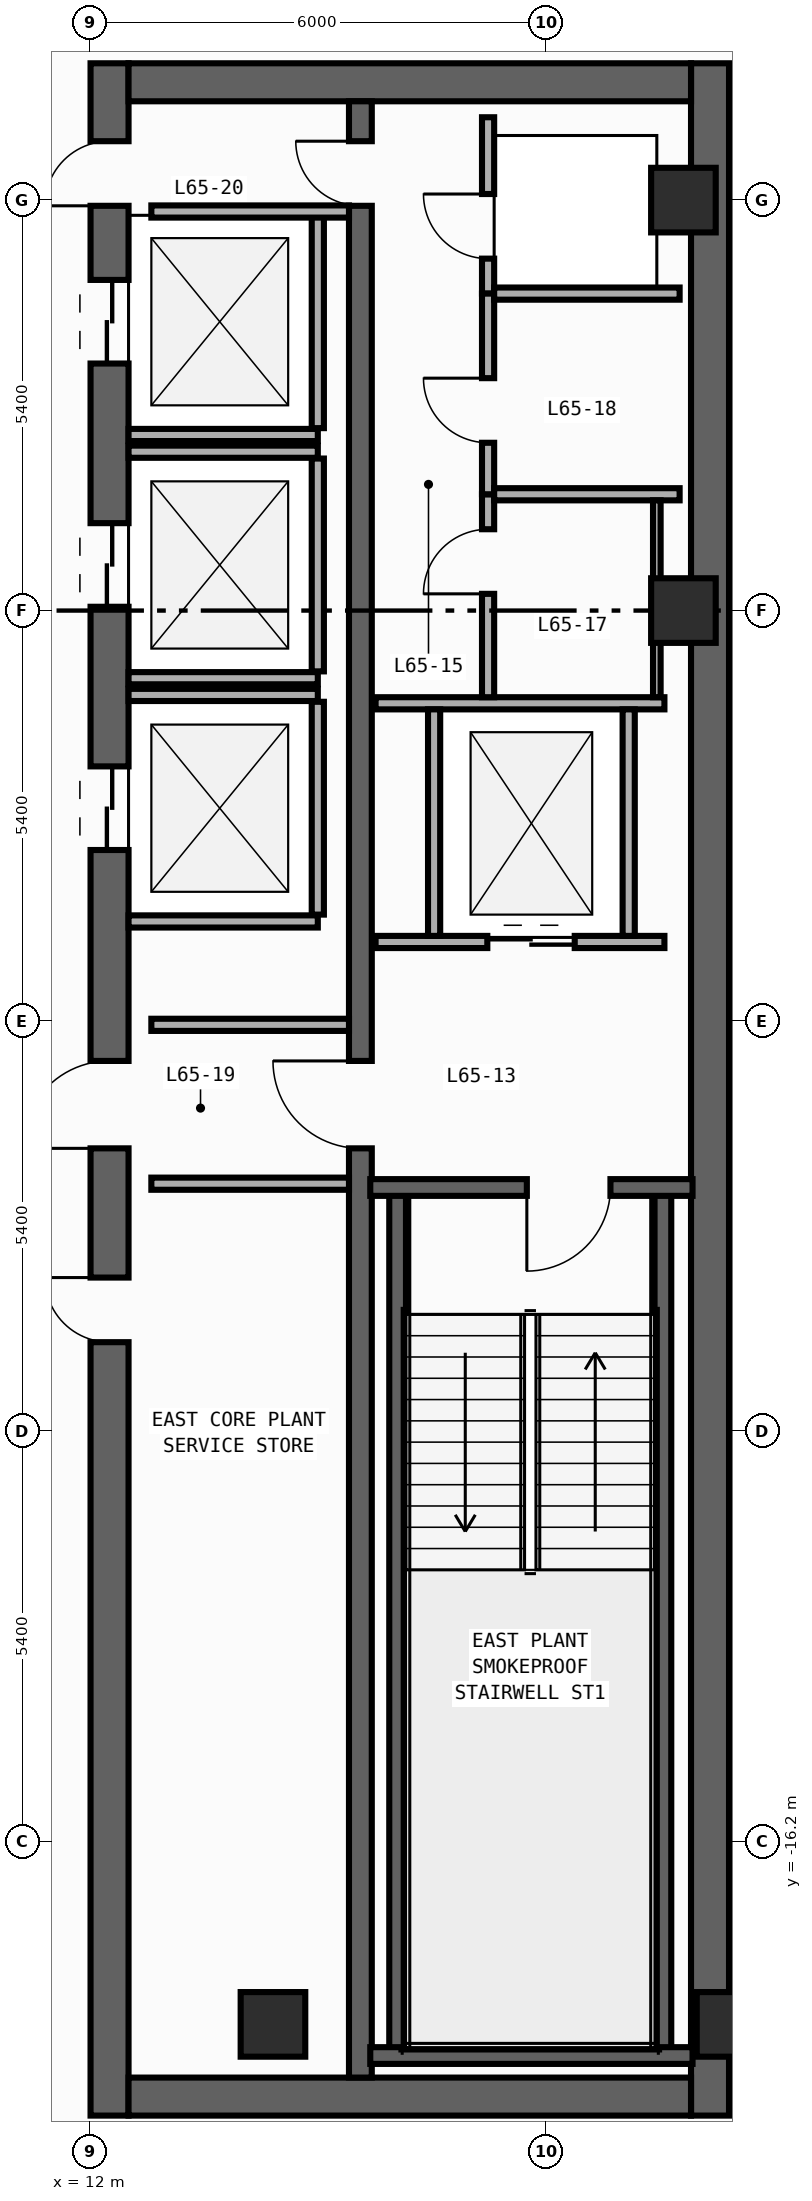
"""IFC4 building model, lengths in metres.
Left out: names, types, materials, properties, quantities, classifications, styles, units other than length and angle.
Written with IfcOpenShell. Run it as: python <this file> out.ifc"""

import sys

from ifc_helpers import new_model, si_unit, direction, frame, frame_2d, origin, origin_2d, place, context, subcontext, project, spatial, rectangle, extrude, element, fill, save


model = new_model("IFC4")
c1 = context("Model", 3, precision=1e-05, world=origin(), true_north=direction((0.0, 1.0)))
c2 = subcontext(c1, "Body", "Model", "MODEL_VIEW")
j1 = project(units=[si_unit("LENGTHUNIT", "METRE"), si_unit("PLANEANGLEUNIT", "RADIAN")], contexts=[c1])
p1 = place(None, origin())
s1 = spatial("IfcSite", under=j1, at=p1, CompositionType="ELEMENT")
p2 = place(p1, origin())
s2 = spatial("IfcBuilding", under=s1, at=p2, CompositionType="ELEMENT")
p3 = place(p2, frame((0.0, 0.0, 272.8)))
s3 = spatial("IfcBuildingStorey", under=s2, at=p3, CompositionType="ELEMENT", Elevation=272.8)
p4 = place(p3, frame((12.25, -19.8, 0.0), z_axis=(0.0, 0.0, 1.0), x_axis=(0.0, 1.0, 0.0)))
e1 = element("IfcWall", 1, at=p4, inside=s3, PredefinedType="SHEAR", context=c2, shape_type="SweptSolid", body=[
    extrude(rectangle(XDim=27.0, YDim=0.5, at=frame_2d((13.5, 0.0))), origin(), (0.0, 0.0, 1.0), 4.54),
])
p5 = place(p4, frame((23.05, 0.0, 0.0)))
e2 = element("IfcOpeningElement", 2, at=p5, cuts=e1, PredefinedType="OPENING", context=c2, shape_type="SweptSolid", body=[
    extrude(rectangle(XDim=1.1, YDim=2.2, at=frame_2d((0.55, 1.1))), frame((0.0, 0.26, 0.0), z_axis=(0.0, -1.0, 0.0), x_axis=(1.0, 0.0, 0.0)), (0.0, 0.0, 1.0), 0.52),
])
p6 = place(p4, frame((19.85, 0.0, 0.0)))
e3 = element("IfcOpeningElement", 3, at=p6, cuts=e1, PredefinedType="OPENING", context=c2, shape_type="SweptSolid", body=[
    extrude(rectangle(XDim=1.1, YDim=2.2, at=frame_2d((0.55, 1.1))), frame((0.0, 0.26, 0.0), z_axis=(0.0, -1.0, 0.0), x_axis=(1.0, 0.0, 0.0)), (0.0, 0.0, 1.0), 0.52),
])
p7 = place(p4, frame((16.65, 0.0, 0.0)))
e4 = element("IfcOpeningElement", 4, at=p7, cuts=e1, PredefinedType="OPENING", context=c2, shape_type="SweptSolid", body=[
    extrude(rectangle(XDim=1.1, YDim=2.2, at=frame_2d((0.55, 1.1))), frame((0.0, 0.26, 0.0), z_axis=(0.0, -1.0, 0.0), x_axis=(1.0, 0.0, 0.0)), (0.0, 0.0, 1.0), 0.52),
])
p8 = place(p4, frame((10.175, 0.0, 0.0)))
e5 = element("IfcOpeningElement", 5, at=p8, cuts=e1, PredefinedType="OPENING", context=c2, shape_type="SweptSolid", body=[
    extrude(rectangle(XDim=0.85, YDim=2.1, at=frame_2d((0.425, 1.05))), frame((0.0, 0.26, 0.0), z_axis=(0.0, -1.0, 0.0), x_axis=(1.0, 0.0, 0.0)), (0.0, 0.0, 1.0), 0.52),
])
p9 = place(p4, frame((12.725, 0.0, 0.0)))
e6 = element("IfcOpeningElement", 6, at=p9, cuts=e1, PredefinedType="OPENING", context=c2, shape_type="SweptSolid", body=[
    extrude(rectangle(XDim=1.15, YDim=2.2, at=frame_2d((0.575, 1.1))), frame((0.0, 0.26, 0.0), z_axis=(0.0, -1.0, 0.0), x_axis=(1.0, 0.0, 0.0)), (0.0, 0.0, 1.0), 0.52),
])
p10 = place(p4, frame((25.125, 0.0, 0.0)))
e7 = element("IfcOpeningElement", 7, at=p10, cuts=e1, PredefinedType="OPENING", context=c2, shape_type="SweptSolid", body=[
    extrude(rectangle(XDim=0.85, YDim=2.1, at=frame_2d((0.425, 1.05))), frame((0.0, 0.26, 0.0), z_axis=(0.0, -1.0, 0.0), x_axis=(1.0, 0.0, 0.0)), (0.0, 0.0, 1.0), 0.52),
])
p11 = place(p3, frame((20.15, -19.8, 0.0), z_axis=(0.0, 0.0, 1.0), x_axis=(0.0, 1.0, 0.0)))
e8 = element("IfcWall", 8, at=p11, inside=s3, PredefinedType="SHEAR", context=c2, shape_type="SweptSolid", body=[
    extrude(rectangle(XDim=27.0, YDim=0.5, at=frame_2d((13.5, 0.0))), origin(), (0.0, 0.0, 1.0), 4.54),
])
for number, where, z_axis, x_axis in (
    (9, (12.5, -19.55, 0.0), (0.0, 0.0, 1.0), (1.0, 0.0, 0.0)),
    (10, (12.5, 6.95, 0.0), (0.0, 0.0, 1.0), (1.0, 0.0, 0.0)),
):
    element("IfcWall", number, at=place(p3, frame(where, z_axis=z_axis, x_axis=x_axis)), inside=s3, PredefinedType="SHEAR", context=c2, shape_type="SweptSolid", body=[
        extrude(rectangle(XDim=7.4, YDim=0.5, at=frame_2d((3.7, 0.0))), origin(), (0.0, 0.0, 1.0), 4.54),
    ])
p12 = place(p3, frame((15.55, -19.3, 0.0), z_axis=(0.0, 0.0, 1.0), x_axis=(0.0, 1.0, 0.0)))
e11 = element("IfcWall", 11, at=p12, inside=s3, PredefinedType="SHEAR", context=c2, shape_type="SweptSolid", body=[
    extrude(rectangle(XDim=26.0, YDim=0.3, at=frame_2d((13.0, 0.0))), origin(), (0.0, 0.0, 1.0), 4.54),
])
p13 = place(p12, frame((12.225, 0.0, 0.0)))
e12 = element("IfcOpeningElement", 12, at=p13, cuts=e11, PredefinedType="OPENING", context=c2, shape_type="SweptSolid", body=[
    extrude(rectangle(XDim=1.15, YDim=2.2, at=frame_2d((0.575, 1.1))), frame((0.0, 0.16, 0.0), z_axis=(0.0, -1.0, 0.0), x_axis=(1.0, 0.0, 0.0)), (0.0, 0.0, 1.0), 0.32),
])
p14 = place(p12, frame((24.625, 0.0, 0.0)))
e13 = element("IfcOpeningElement", 13, at=p14, cuts=e11, PredefinedType="OPENING", context=c2, shape_type="SweptSolid", body=[
    extrude(rectangle(XDim=0.85, YDim=2.1, at=frame_2d((0.425, 1.05))), frame((0.0, 0.16, 0.0), z_axis=(0.0, -1.0, 0.0), x_axis=(1.0, 0.0, 0.0)), (0.0, 0.0, 1.0), 0.32),
])
for number, where, z_axis, x_axis in (
    (14, (16.04, -19.01, 0.0), (0.0, 0.0, 1.0), (0.0, 1.0, 0.0)),
    (15, (19.53, -19.01, 0.0), (0.0, 0.0, 1.0), (0.0, 1.0, 0.0)),
):
    element("IfcWall", number, at=place(p3, frame(where, z_axis=z_axis, x_axis=x_axis)), inside=s3, PredefinedType="SHEAR", context=c2, shape_type="SweptSolid", body=[
        extrude(rectangle(XDim=11.42, YDim=0.22, at=frame_2d((5.71, 0.0))), origin(), (0.0, 0.0, 1.0), 4.54),
    ])
p15 = place(p3, frame((15.68, -19.01, 0.0), z_axis=(0.0, 0.0, 1.0), x_axis=(1.0, 0.0, 0.0)))
e16 = element("IfcWall", 16, at=p15, inside=s3, PredefinedType="SHEAR", context=c2, shape_type="SweptSolid", body=[
    extrude(rectangle(XDim=4.24, YDim=0.22, at=frame_2d((2.12, 0.0))), origin(), (0.0, 0.0, 1.0), 4.54),
])
p16 = place(p3, frame((19.92, -7.59, 0.0), z_axis=(0.0, 0.0, 1.0), x_axis=(-1.0, 0.0, 0.0)))
e17 = element("IfcWall", 17, at=p16, inside=s3, PredefinedType="SHEAR", context=c2, shape_type="SweptSolid", body=[
    extrude(rectangle(XDim=4.24, YDim=0.22, at=frame_2d((2.12, 0.0))), origin(), (0.0, 0.0, 1.0), 4.54),
])
p17 = place(p16, frame((1.08, 0.0, 0.0)))
e18 = element("IfcOpeningElement", 18, at=p17, cuts=e17, PredefinedType="OPENING", context=c2, shape_type="SweptSolid", body=[
    extrude(rectangle(XDim=1.1, YDim=2.2, at=frame_2d((0.55, 1.1))), frame((0.0, 0.12, 0.0), z_axis=(0.0, -1.0, 0.0), x_axis=(1.0, 0.0, 0.0)), (0.0, 0.0, 1.0), 0.24),
])
for number, where, z_axis, x_axis in (
    (19, (20.4, -18.6, 0.0), (0.0, 0.0, 1.0), (1.0, 0.0, 0.0)),
    (20, (14.4, -18.6, 0.0), (0.0, 0.0, 1.0), (1.0, 0.0, 0.0)),
    (21, (19.8, 0.0, 0.0), (0.0, 0.0, 1.0), (1.0, 0.0, 0.0)),
    (22, (19.8, 5.4, 0.0), (0.0, 0.0, 1.0), (1.0, 0.0, 0.0)),
):
    element("IfcColumn", number, at=place(p3, frame(where, z_axis=z_axis, x_axis=x_axis)), inside=s3, PredefinedType="COLUMN", context=c2, shape_type="SweptSolid", body=[
        extrude(rectangle(XDim=0.85, YDim=0.85, at=origin_2d()), origin(), (0.0, 0.0, 1.0), 4.8),
    ])
p18 = place(p3, frame((20.42, -10.8, 0.0), z_axis=(0.0, 0.0, 1.0), x_axis=(1.0, 0.0, 0.0)))
e23 = element("IfcWall", 23, at=p18, inside=s3, PredefinedType="SHEAR", context=c2, shape_type="SweptSolid", body=[
    extrude(rectangle(XDim=0.58, YDim=0.6, at=frame_2d((0.29, 0.0))), origin(), (0.0, 0.0, 1.0), 4.54),
])
p19 = place(p3, frame((12.5, 2.31, 0.0), z_axis=(0.0, 0.0, 1.0), x_axis=(1.0, 0.0, 0.0)))
e24 = element("IfcWall", 24, at=p19, inside=s3, PredefinedType="STANDARD", context=c2, shape_type="SweptSolid", body=[
    extrude(rectangle(XDim=2.49, YDim=0.16, at=frame_2d((1.245, 0.0))), origin(), (0.0, 0.0, 1.0), 4.54),
])
p20 = place(p3, frame((14.99, 2.4, 0.0), z_axis=(0.0, 0.0, 1.0), x_axis=(0.0, 1.0, 0.0)))
e25 = element("IfcWall", 25, at=p20, inside=s3, PredefinedType="STANDARD", context=c2, shape_type="SweptSolid", body=[
    extrude(rectangle(XDim=2.8, YDim=0.16, at=frame_2d((1.4, 0.0))), origin(), (0.0, 0.0, 1.0), 4.54),
])
for number, where, z_axis, x_axis in (
    (26, (12.5, -0.89, 0.0), (0.0, 0.0, 1.0), (1.0, 0.0, 0.0)),
    (27, (12.5, 2.09, 0.0), (0.0, 0.0, 1.0), (1.0, 0.0, 0.0)),
):
    element("IfcWall", number, at=place(p3, frame(where, z_axis=z_axis, x_axis=x_axis)), inside=s3, PredefinedType="STANDARD", context=c2, shape_type="SweptSolid", body=[
        extrude(rectangle(XDim=2.49, YDim=0.16, at=frame_2d((1.245, 0.0))), origin(), (0.0, 0.0, 1.0), 4.54),
    ])
p21 = place(p3, frame((14.99, -0.8, 0.0), z_axis=(0.0, 0.0, 1.0), x_axis=(0.0, 1.0, 0.0)))
e28 = element("IfcWall", 28, at=p21, inside=s3, PredefinedType="STANDARD", context=c2, shape_type="SweptSolid", body=[
    extrude(rectangle(XDim=2.8, YDim=0.16, at=frame_2d((1.4, 0.0))), origin(), (0.0, 0.0, 1.0), 4.54),
])
for number, where, z_axis, x_axis in (
    (29, (12.5, -4.09, 0.0), (0.0, 0.0, 1.0), (1.0, 0.0, 0.0)),
    (30, (12.5, -1.11, 0.0), (0.0, 0.0, 1.0), (1.0, 0.0, 0.0)),
):
    element("IfcWall", number, at=place(p3, frame(where, z_axis=z_axis, x_axis=x_axis)), inside=s3, PredefinedType="STANDARD", context=c2, shape_type="SweptSolid", body=[
        extrude(rectangle(XDim=2.49, YDim=0.16, at=frame_2d((1.245, 0.0))), origin(), (0.0, 0.0, 1.0), 4.54),
    ])
p22 = place(p3, frame((14.99, -4.0, 0.0), z_axis=(0.0, 0.0, 1.0), x_axis=(0.0, 1.0, 0.0)))
e31 = element("IfcWall", 31, at=p22, inside=s3, PredefinedType="STANDARD", context=c2, shape_type="SweptSolid", body=[
    extrude(rectangle(XDim=2.8, YDim=0.16, at=frame_2d((1.4, 0.0))), origin(), (0.0, 0.0, 1.0), 4.54),
])
p23 = place(p3, frame((15.75, -4.36, 0.0), z_axis=(0.0, 0.0, 1.0), x_axis=(1.0, 0.0, 0.0)))
e32 = element("IfcWall", 32, at=p23, inside=s3, PredefinedType="STANDARD", context=c2, shape_type="SweptSolid", body=[
    extrude(rectangle(XDim=3.8, YDim=0.16, at=frame_2d((1.9, 0.0))), origin(), (0.0, 0.0, 1.0), 4.54),
])
p24 = place(p23, frame((1.47, 0.0, 0.0)))
e33 = element("IfcOpeningElement", 33, at=p24, cuts=e32, PredefinedType="OPENING", context=c2, shape_type="SweptSolid", body=[
    extrude(rectangle(XDim=1.15, YDim=2.2, at=frame_2d((0.575, 1.1))), frame((0.0, 0.09, 0.0), z_axis=(0.0, -1.0, 0.0), x_axis=(1.0, 0.0, 0.0)), (0.0, 0.0, 1.0), 0.18),
])
p25 = place(p3, frame((15.75, -1.22, 0.0), z_axis=(0.0, 0.0, 1.0), x_axis=(1.0, 0.0, 0.0)))
e34 = element("IfcWall", 34, at=p25, inside=s3, PredefinedType="STANDARD", context=c2, shape_type="SweptSolid", body=[
    extrude(rectangle(XDim=3.8, YDim=0.16, at=frame_2d((1.9, 0.0))), origin(), (0.0, 0.0, 1.0), 4.54),
])
for number, where, z_axis, x_axis in (
    (35, (16.52, -4.28, 0.0), (0.0, 0.0, 1.0), (0.0, 1.0, 0.0)),
    (36, (19.08, -4.28, 0.0), (0.0, 0.0, 1.0), (0.0, 1.0, 0.0)),
):
    element("IfcWall", number, at=place(p3, frame(where, z_axis=z_axis, x_axis=x_axis)), inside=s3, PredefinedType="STANDARD", context=c2, shape_type="SweptSolid", body=[
        extrude(rectangle(XDim=2.98, YDim=0.16, at=frame_2d((1.49, 0.0))), origin(), (0.0, 0.0, 1.0), 4.54),
    ])
for number, where, z_axis, x_axis in (
    (37, (12.8, -5.45, 0.0), (0.0, 0.0, 1.0), (1.0, 0.0, 0.0)),
    (38, (12.8, -7.54, 0.0), (0.0, 0.0, 1.0), (1.0, 0.0, 0.0)),
    (39, (12.8, 5.25, 0.0), (0.0, 0.0, 1.0), (1.0, 0.0, 0.0)),
):
    element("IfcWall", number, at=place(p3, frame(where, z_axis=z_axis, x_axis=x_axis)), inside=s3, PredefinedType="STANDARD", context=c2, shape_type="SweptSolid", body=[
        extrude(rectangle(XDim=2.6, YDim=0.16, at=frame_2d((1.3, 0.0))), origin(), (0.0, 0.0, 1.0), 4.54),
    ])
p26 = place(p3, frame((17.23, 4.17, 0.0), z_axis=(0.0, 0.0, 1.0), x_axis=(0.0, 1.0, 0.0)))
e40 = element("IfcWall", 40, at=p26, inside=s3, PredefinedType="PARTITIONING", context=c2, shape_type="SweptSolid", body=[
    extrude(rectangle(XDim=2.32, YDim=0.16, at=frame_2d((1.16, 0.0))), origin(), (0.0, 0.0, 1.0), 4.54),
])
p27 = place(p26, frame((0.46, 0.0, 0.0)))
e41 = element("IfcOpeningElement", 41, at=p27, cuts=e40, PredefinedType="OPENING", context=c2, shape_type="SweptSolid", body=[
    extrude(rectangle(XDim=0.85, YDim=2.1, at=frame_2d((0.425, 1.05))), frame((0.0, 0.09, 0.0), z_axis=(0.0, -1.0, 0.0), x_axis=(1.0, 0.0, 0.0)), (0.0, 0.0, 1.0), 0.18),
])
p28 = place(p3, frame((17.23, -1.14, 0.0), z_axis=(0.0, 0.0, 1.0), x_axis=(0.0, 1.0, 0.0)))
e42 = element("IfcWall", 42, at=p28, inside=s3, PredefinedType="PARTITIONING", context=c2, shape_type="SweptSolid", body=[
    extrude(rectangle(XDim=2.67, YDim=0.16, at=frame_2d((1.335, 0.0))), origin(), (0.0, 0.0, 1.0), 4.54),
])
p29 = place(p28, frame((1.36, 0.0, 0.0)))
e43 = element("IfcOpeningElement", 43, at=p29, cuts=e42, PredefinedType="OPENING", context=c2, shape_type="SweptSolid", body=[
    extrude(rectangle(XDim=0.85, YDim=2.1, at=frame_2d((0.425, 1.05))), frame((0.0, 0.09, 0.0), z_axis=(0.0, -1.0, 0.0), x_axis=(1.0, 0.0, 0.0)), (0.0, 0.0, 1.0), 0.18),
])
p30 = place(p3, frame((17.23, 1.53, 0.0), z_axis=(0.0, 0.0, 1.0), x_axis=(0.0, 1.0, 0.0)))
e44 = element("IfcWall", 44, at=p30, inside=s3, PredefinedType="PARTITIONING", context=c2, shape_type="SweptSolid", body=[
    extrude(rectangle(XDim=2.64, YDim=0.16, at=frame_2d((1.32, 0.0))), origin(), (0.0, 0.0, 1.0), 4.54),
])
p31 = place(p30, frame((0.677, 0.0, 0.0)))
e45 = element("IfcOpeningElement", 45, at=p31, cuts=e44, PredefinedType="OPENING", context=c2, shape_type="SweptSolid", body=[
    extrude(rectangle(XDim=0.85, YDim=2.1, at=frame_2d((0.425, 1.05))), frame((0.0, 0.09, 0.0), z_axis=(0.0, -1.0, 0.0), x_axis=(1.0, 0.0, 0.0)), (0.0, 0.0, 1.0), 0.18),
])
for number, where, z_axis, x_axis in (
    (46, (17.31, 4.17, 0.0), (0.0, 0.0, 1.0), (1.0, 0.0, 0.0)),
    (47, (17.31, 1.53, 0.0), (0.0, 0.0, 1.0), (1.0, 0.0, 0.0)),
):
    element("IfcWall", number, at=place(p3, frame(where, z_axis=z_axis, x_axis=x_axis)), inside=s3, PredefinedType="PARTITIONING", context=c2, shape_type="SweptSolid", body=[
        extrude(rectangle(XDim=2.44, YDim=0.16, at=frame_2d((1.22, 0.0))), origin(), (0.0, 0.0, 1.0), 4.54),
    ])
p32 = place(p3, frame((19.45, 1.45, 0.0), z_axis=(0.0, 0.0, 1.0), x_axis=(0.0, -1.0, 0.0)))
e48 = element("IfcWall", 48, at=p32, inside=s3, PredefinedType="PARTITIONING", context=c2, shape_type="SweptSolid", body=[
    extrude(rectangle(XDim=2.59, YDim=0.1, at=frame_2d((1.295, 0.0))), origin(), (0.0, 0.0, 1.0), 4.54),
])
p33 = place(p17, origin())
e49 = element("IfcDoor", 49, at=p33, inside=s3, OperationType="SINGLE_SWING_RIGHT", PredefinedType="DOOR", context=c2, shape_type="SweptSolid", body=[
    extrude(rectangle(XDim=1.1, YDim=2.2, at=frame_2d((0.55, 1.1))), frame((0.0, 0.025, 0.0), z_axis=(0.0, -1.0, 0.0), x_axis=(1.0, 0.0, 0.0)), (0.0, 0.0, 1.0), 0.05),
])
fill(e18, e49)
p34 = place(p5, origin())
e50 = element("IfcDoor", 50, at=p34, inside=s3, OperationType="DOUBLE_DOOR_SLIDING", PredefinedType="DOOR", context=c2, shape_type="SweptSolid", body=[
    extrude(rectangle(XDim=1.1, YDim=2.2, at=frame_2d((0.55, 1.1))), frame((0.0, 0.025, 0.0), z_axis=(0.0, -1.0, 0.0), x_axis=(1.0, 0.0, 0.0)), (0.0, 0.0, 1.0), 0.05),
])
fill(e2, e50)
p35 = place(p6, origin())
e51 = element("IfcDoor", 51, at=p35, inside=s3, OperationType="DOUBLE_DOOR_SLIDING", PredefinedType="DOOR", context=c2, shape_type="SweptSolid", body=[
    extrude(rectangle(XDim=1.1, YDim=2.2, at=frame_2d((0.55, 1.1))), frame((0.0, 0.025, 0.0), z_axis=(0.0, -1.0, 0.0), x_axis=(1.0, 0.0, 0.0)), (0.0, 0.0, 1.0), 0.05),
])
fill(e3, e51)
p36 = place(p7, origin())
e52 = element("IfcDoor", 52, at=p36, inside=s3, OperationType="DOUBLE_DOOR_SLIDING", PredefinedType="DOOR", context=c2, shape_type="SweptSolid", body=[
    extrude(rectangle(XDim=1.1, YDim=2.2, at=frame_2d((0.55, 1.1))), frame((0.0, 0.025, 0.0), z_axis=(0.0, -1.0, 0.0), x_axis=(1.0, 0.0, 0.0)), (0.0, 0.0, 1.0), 0.05),
])
fill(e4, e52)
p37 = place(p8, origin())
e53 = element("IfcDoor", 53, at=p37, inside=s3, OperationType="SINGLE_SWING_RIGHT", PredefinedType="DOOR", context=c2, shape_type="SweptSolid", body=[
    extrude(rectangle(XDim=0.85, YDim=2.1, at=frame_2d((0.425, 1.05))), frame((0.0, 0.025, 0.0), z_axis=(0.0, -1.0, 0.0), x_axis=(1.0, 0.0, 0.0)), (0.0, 0.0, 1.0), 0.05),
])
fill(e5, e53)
p38 = place(p9, origin())
e54 = element("IfcDoor", 54, at=p38, inside=s3, OperationType="SINGLE_SWING_LEFT", PredefinedType="DOOR", context=c2, shape_type="SweptSolid", body=[
    extrude(rectangle(XDim=1.15, YDim=2.2, at=frame_2d((0.575, 1.1))), frame((0.0, 0.025, 0.0), z_axis=(0.0, -1.0, 0.0), x_axis=(1.0, 0.0, 0.0)), (0.0, 0.0, 1.0), 0.05),
])
fill(e6, e54)
p39 = place(p13, origin())
e55 = element("IfcDoor", 55, at=p39, inside=s3, OperationType="SINGLE_SWING_RIGHT", PredefinedType="DOOR", context=c2, shape_type="SweptSolid", body=[
    extrude(rectangle(XDim=1.15, YDim=2.2, at=frame_2d((0.575, 1.1))), frame((0.0, 0.025, 0.0), z_axis=(0.0, -1.0, 0.0), x_axis=(1.0, 0.0, 0.0)), (0.0, 0.0, 1.0), 0.05),
])
fill(e12, e55)
p40 = place(p10, origin())
e56 = element("IfcDoor", 56, at=p40, inside=s3, OperationType="SINGLE_SWING_LEFT", PredefinedType="DOOR", context=c2, shape_type="SweptSolid", body=[
    extrude(rectangle(XDim=0.85, YDim=2.1, at=frame_2d((0.425, 1.05))), frame((0.0, 0.025, 0.0), z_axis=(0.0, -1.0, 0.0), x_axis=(1.0, 0.0, 0.0)), (0.0, 0.0, 1.0), 0.05),
])
fill(e7, e56)
p41 = place(p14, origin())
e57 = element("IfcDoor", 57, at=p41, inside=s3, OperationType="SINGLE_SWING_RIGHT", PredefinedType="DOOR", context=c2, shape_type="SweptSolid", body=[
    extrude(rectangle(XDim=0.85, YDim=2.1, at=frame_2d((0.425, 1.05))), frame((0.0, 0.025, 0.0), z_axis=(0.0, -1.0, 0.0), x_axis=(1.0, 0.0, 0.0)), (0.0, 0.0, 1.0), 0.05),
])
fill(e13, e57)
p42 = place(p24, origin())
e58 = element("IfcDoor", 58, at=p42, inside=s3, OperationType="DOUBLE_DOOR_SLIDING", PredefinedType="DOOR", context=c2, shape_type="SweptSolid", body=[
    extrude(rectangle(XDim=1.15, YDim=2.2, at=frame_2d((0.575, 1.1))), frame((0.0, 0.025, 0.0), z_axis=(0.0, -1.0, 0.0), x_axis=(1.0, 0.0, 0.0)), (0.0, 0.0, 1.0), 0.05),
])
fill(e33, e58)
p43 = place(p27, origin())
e59 = element("IfcDoor", 59, at=p43, inside=s3, OperationType="SINGLE_SWING_RIGHT", PredefinedType="DOOR", context=c2, shape_type="SweptSolid", body=[
    extrude(rectangle(XDim=0.85, YDim=2.1, at=frame_2d((0.425, 1.05))), frame((0.0, 0.025, 0.0), z_axis=(0.0, -1.0, 0.0), x_axis=(1.0, 0.0, 0.0)), (0.0, 0.0, 1.0), 0.05),
])
fill(e41, e59)
p44 = place(p29, origin())
e60 = element("IfcDoor", 60, at=p44, inside=s3, OperationType="SINGLE_SWING_LEFT", PredefinedType="DOOR", context=c2, shape_type="SweptSolid", body=[
    extrude(rectangle(XDim=0.85, YDim=2.1, at=frame_2d((0.425, 1.05))), frame((0.0, 0.025, 0.0), z_axis=(0.0, -1.0, 0.0), x_axis=(1.0, 0.0, 0.0)), (0.0, 0.0, 1.0), 0.05),
])
fill(e43, e60)
p45 = place(p31, origin())
e61 = element("IfcDoor", 61, at=p45, inside=s3, OperationType="SINGLE_SWING_RIGHT", PredefinedType="DOOR", context=c2, shape_type="SweptSolid", body=[
    extrude(rectangle(XDim=0.85, YDim=2.1, at=frame_2d((0.425, 1.05))), frame((0.0, 0.025, 0.0), z_axis=(0.0, -1.0, 0.0), x_axis=(1.0, 0.0, 0.0)), (0.0, 0.0, 1.0), 0.05),
])
fill(e45, e61)
save(model, sys.argv[1])
